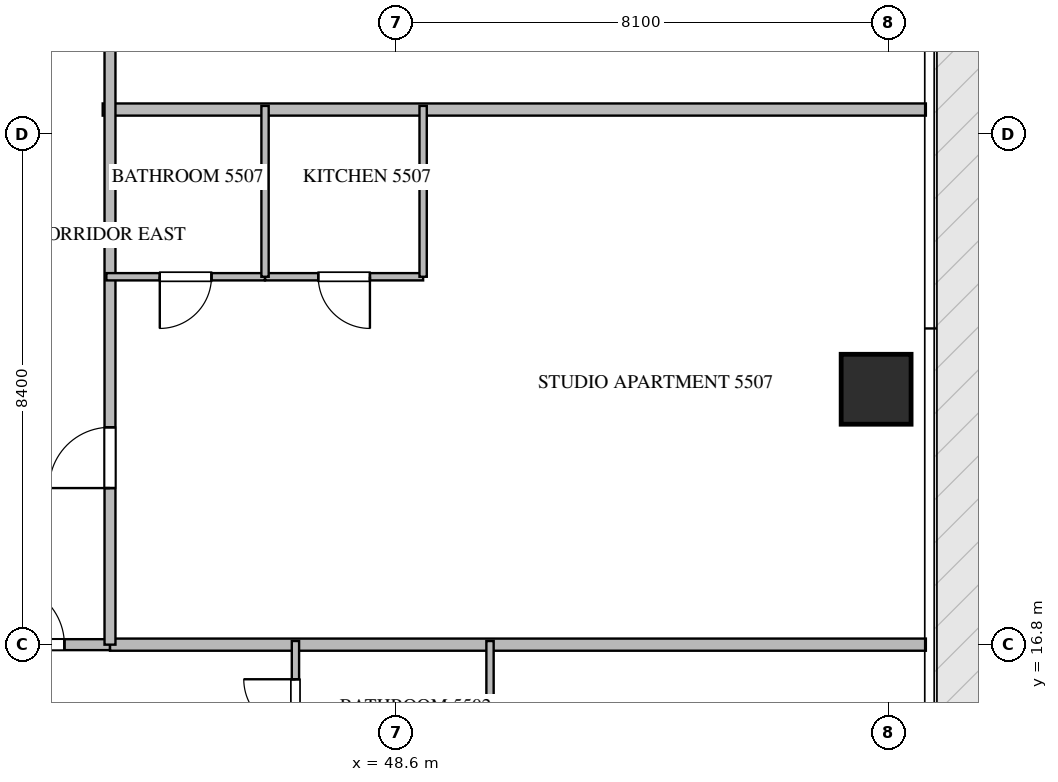
"""IFC4 building model, lengths in metres.
Left out: names, types, materials, properties, quantities, classifications, styles, units other than length and angle.
Written with IfcOpenShell. Run it as: python <this file> out.ifc"""

import sys

from ifc_helpers import new_model, si_unit, direction, frame, frame_2d, origin, origin_2d, place, context, subcontext, project, spatial, rectangle, extrude, source, transform, mapped, element, fill, save


model = new_model("IFC4")
c1 = context("Model", 3, precision=1e-05, world=origin(), true_north=direction((0.0, 1.0)))
c2 = subcontext(c1, "Body", "Model", "MODEL_VIEW")
j1 = project(units=[si_unit("LENGTHUNIT", "METRE"), si_unit("PLANEANGLEUNIT", "RADIAN")], contexts=[c1])
p1 = place(None, origin())
s1 = spatial("IfcSite", under=j1, at=p1, CompositionType="ELEMENT")
p2 = place(p1, origin())
s2 = spatial("IfcBuilding", under=s1, at=p2, CompositionType="ELEMENT")
p3 = place(p2, frame((0.0, 0.0, 222.0)))
s3 = spatial("IfcBuildingStorey", under=s2, at=p3, CompositionType="ELEMENT", Elevation=222.0)
m1 = source(origin(), c2, "Body", "SweptSolid", [
    extrude(rectangle(XDim=1.15, YDim=1.15, at=origin_2d()), origin(), (0.0, 0.0, 1.0), 3.85),
])
p4 = place(p3, frame((56.5, 21.0, -0.26), z_axis=(0.0, 0.0, 1.0), x_axis=(1.0, 0.0, 0.0)))
e1 = element("IfcColumn", 1, at=p4, inside=s3, PredefinedType="COLUMN", context=c2, shape_type="MappedRepresentation", body=[
    mapped(m1, transform((0.0, 0.0, 0.0), scale=1.0)),
])
p5 = place(p3, frame((43.78, 25.6, 0.0), z_axis=(0.0, 0.0, 1.0), x_axis=(1.0, 0.0, 0.0)))
e2 = element("IfcWall", 2, at=p5, inside=s3, PredefinedType="PARTITIONING", context=c2, shape_type="SweptSolid", body=[
    extrude(rectangle(XDim=13.538, YDim=0.2, at=frame_2d((6.769, 0.0))), origin(), (0.0, 0.0, 1.0), 3.59),
])
p6 = place(p3, frame((43.9, 16.8, 0.0), z_axis=(0.0, 0.0, 1.0), x_axis=(1.0, 0.0, 0.0)))
e3 = element("IfcWall", 3, at=p6, inside=s3, PredefinedType="PARTITIONING", context=c2, shape_type="SweptSolid", body=[
    extrude(rectangle(XDim=13.418, YDim=0.2, at=frame_2d((6.709, 0.0))), origin(), (0.0, 0.0, 1.0), 3.59),
])
p7 = place(p3, frame((41.402, 16.8, 0.0), z_axis=(0.0, 0.0, 1.0), x_axis=(1.0, 0.0, 0.0)))
e4 = element("IfcWall", 4, at=p7, inside=s3, PredefinedType="PARTITIONING", context=c2, shape_type="SweptSolid", body=[
    extrude(rectangle(XDim=2.496, YDim=0.18, at=frame_2d((1.248, 0.0))), origin(), (0.0, 0.0, 1.0), 3.59),
])
p8 = place(p7, frame((0.748, 0.0, 0.0)))
e5 = element("IfcOpeningElement", 5, at=p8, cuts=e4, PredefinedType="OPENING", context=c2, shape_type="SweptSolid", body=[
    extrude(rectangle(XDim=1.0, YDim=2.15, at=frame_2d((0.5, 1.075))), frame((0.0, 0.1, 0.0), z_axis=(0.0, -1.0, 0.0), x_axis=(1.0, 0.0, 0.0)), (0.0, 0.0, 1.0), 0.2),
])
p9 = place(p3, frame((43.9, 16.8, 0.0), z_axis=(0.0, 0.0, 1.0), x_axis=(0.0, 1.0, 0.0)))
e6 = element("IfcWall", 6, at=p9, inside=s3, PredefinedType="PARTITIONING", context=c2, shape_type="SweptSolid", body=[
    extrude(rectangle(XDim=16.8, YDim=0.18, at=frame_2d((8.4, 0.0))), origin(), (0.0, 0.0, 1.0), 3.59),
])
p10 = place(p9, frame((2.575, 0.0, 0.0)))
e7 = element("IfcOpeningElement", 7, at=p10, cuts=e6, PredefinedType="OPENING", context=c2, shape_type="SweptSolid", body=[
    extrude(rectangle(XDim=1.0, YDim=2.15, at=frame_2d((0.5, 1.075))), frame((0.0, 0.1, 0.0), z_axis=(0.0, -1.0, 0.0), x_axis=(1.0, 0.0, 0.0)), (0.0, 0.0, 1.0), 0.2),
])
p11 = place(p9, frame((10.997, 0.0, 0.0)))
e8 = element("IfcOpeningElement", 8, at=p11, cuts=e6, PredefinedType="OPENING", context=c2, shape_type="SweptSolid", body=[
    extrude(rectangle(XDim=1.0, YDim=2.15, at=frame_2d((0.5, 1.075))), frame((0.0, 0.1, 0.0), z_axis=(0.0, -1.0, 0.0), x_axis=(1.0, 0.0, 0.0)), (0.0, 0.0, 1.0), 0.2),
])
p12 = place(p3, frame((50.15, 14.75, 0.0), z_axis=(0.0, 0.0, 1.0), x_axis=(0.0, 1.0, 0.0)))
e9 = element("IfcWall", 9, at=p12, inside=s3, PredefinedType="PARTITIONING", context=c2, shape_type="SweptSolid", body=[
    extrude(rectangle(XDim=2.11, YDim=0.12, at=frame_2d((1.055, 0.0))), origin(), (0.0, 0.0, 1.0), 3.59),
])
p13 = place(p3, frame((46.95, 14.752, 0.0), z_axis=(0.0, 0.0, 1.0), x_axis=(0.0, 1.0, 0.0)))
e10 = element("IfcWall", 10, at=p13, inside=s3, PredefinedType="PARTITIONING", context=c2, shape_type="SweptSolid", body=[
    extrude(rectangle(XDim=2.108, YDim=0.12, at=frame_2d((1.054, 0.0))), origin(), (0.0, 0.0, 1.0), 3.59),
])
p14 = place(p13, frame((0.629, 0.0, 0.0)))
e11 = element("IfcOpeningElement", 11, at=p14, cuts=e10, PredefinedType="OPENING", context=c2, shape_type="SweptSolid", body=[
    extrude(rectangle(XDim=0.85, YDim=2.1, at=frame_2d((0.425, 1.05))), frame((0.0, 0.07, 0.0), z_axis=(0.0, -1.0, 0.0), x_axis=(1.0, 0.0, 0.0)), (0.0, 0.0, 1.0), 0.14),
])
p15 = place(p3, frame((49.05, 22.85, 0.0), z_axis=(0.0, 0.0, 1.0), x_axis=(-1.0, 0.0, 0.0)))
e12 = element("IfcWall", 12, at=p15, inside=s3, PredefinedType="PARTITIONING", context=c2, shape_type="SweptSolid", body=[
    extrude(rectangle(XDim=2.6, YDim=0.12, at=frame_2d((1.3, 0.0))), origin(), (0.0, 0.0, 1.0), 3.59),
])
p16 = place(p15, frame((0.875, 0.0, 0.0)))
e13 = element("IfcOpeningElement", 13, at=p16, cuts=e12, PredefinedType="OPENING", context=c2, shape_type="SweptSolid", body=[
    extrude(rectangle(XDim=0.85, YDim=2.1, at=frame_2d((0.425, 1.05))), frame((0.0, 0.07, 0.0), z_axis=(0.0, -1.0, 0.0), x_axis=(1.0, 0.0, 0.0)), (0.0, 0.0, 1.0), 0.14),
])
p17 = place(p3, frame((46.448, 22.85, 0.0), z_axis=(0.0, 0.0, 1.0), x_axis=(-1.0, 0.0, 0.0)))
e14 = element("IfcWall", 14, at=p17, inside=s3, PredefinedType="PARTITIONING", context=c2, shape_type="SweptSolid", body=[
    extrude(rectangle(XDim=2.608, YDim=0.12, at=frame_2d((1.304, 0.0))), origin(), (0.0, 0.0, 1.0), 3.59),
])
p18 = place(p17, frame((0.879, 0.0, 0.0)))
e15 = element("IfcOpeningElement", 15, at=p18, cuts=e14, PredefinedType="OPENING", context=c2, shape_type="SweptSolid", body=[
    extrude(rectangle(XDim=0.85, YDim=2.1, at=frame_2d((0.425, 1.05))), frame((0.0, 0.07, 0.0), z_axis=(0.0, -1.0, 0.0), x_axis=(1.0, 0.0, 0.0)), (0.0, 0.0, 1.0), 0.14),
])
for number, where, z_axis, x_axis in (
    (16, (46.45, 22.85, 0.0), (0.0, 0.0, 1.0), (0.0, 1.0, 0.0)),
    (17, (49.05, 22.85, 0.0), (0.0, 0.0, 1.0), (0.0, 1.0, 0.0)),
):
    element("IfcWall", number, at=place(p3, frame(where, z_axis=z_axis, x_axis=x_axis)), inside=s3, PredefinedType="PARTITIONING", context=c2, shape_type="SweptSolid", body=[
        extrude(rectangle(XDim=2.81, YDim=0.12, at=frame_2d((1.405, 0.0))), origin(), (0.0, 0.0, 1.0), 3.59),
    ])
m2 = source(origin(), c2, "Body", "SweptSolid", [
    extrude(rectangle(XDim=1.0, YDim=2.15, at=frame_2d((0.5, 1.075))), frame((0.0, 0.025, 0.0), z_axis=(0.0, -1.0, 0.0), x_axis=(1.0, 0.0, 0.0)), (0.0, 0.0, 1.0), 0.05),
])
p19 = place(p8, origin())
e18 = element("IfcDoor", 18, at=p19, inside=s3, OperationType="SINGLE_SWING_LEFT", PredefinedType="DOOR", context=c2, shape_type="MappedRepresentation", body=[
    mapped(m2, transform((0.0, 0.0, 0.0), scale=1.0)),
])
fill(e5, e18)
p20 = place(p10, origin())
e19 = element("IfcDoor", 19, at=p20, inside=s3, OperationType="SINGLE_SWING_LEFT", PredefinedType="DOOR", context=c2, shape_type="MappedRepresentation", body=[
    mapped(m2, transform((0.0, 0.0, 0.0), scale=1.0)),
])
fill(e7, e19)
m3 = source(origin(), c2, "Body", "SweptSolid", [
    extrude(rectangle(XDim=0.85, YDim=2.1, at=frame_2d((0.425, 1.05))), frame((0.0, 0.025, 0.0), z_axis=(0.0, -1.0, 0.0), x_axis=(1.0, 0.0, 0.0)), (0.0, 0.0, 1.0), 0.05),
])
p21 = place(p14, origin())
e20 = element("IfcDoor", 20, at=p21, inside=s3, OperationType="SINGLE_SWING_RIGHT", PredefinedType="DOOR", context=c2, shape_type="MappedRepresentation", body=[
    mapped(m3, transform((0.0, 0.0, 0.0), scale=1.0)),
])
fill(e11, e20)
p22 = place(p16, origin())
e21 = element("IfcDoor", 21, at=p22, inside=s3, OperationType="SINGLE_SWING_LEFT", PredefinedType="DOOR", context=c2, shape_type="MappedRepresentation", body=[
    mapped(m3, transform((0.0, 0.0, 0.0), scale=1.0)),
])
fill(e13, e21)
p23 = place(p18, origin())
e22 = element("IfcDoor", 22, at=p23, inside=s3, OperationType="SINGLE_SWING_RIGHT", PredefinedType="DOOR", context=c2, shape_type="MappedRepresentation", body=[
    mapped(m3, transform((0.0, 0.0, 0.0), scale=1.0)),
])
fill(e15, e22)
save(model, sys.argv[1])
